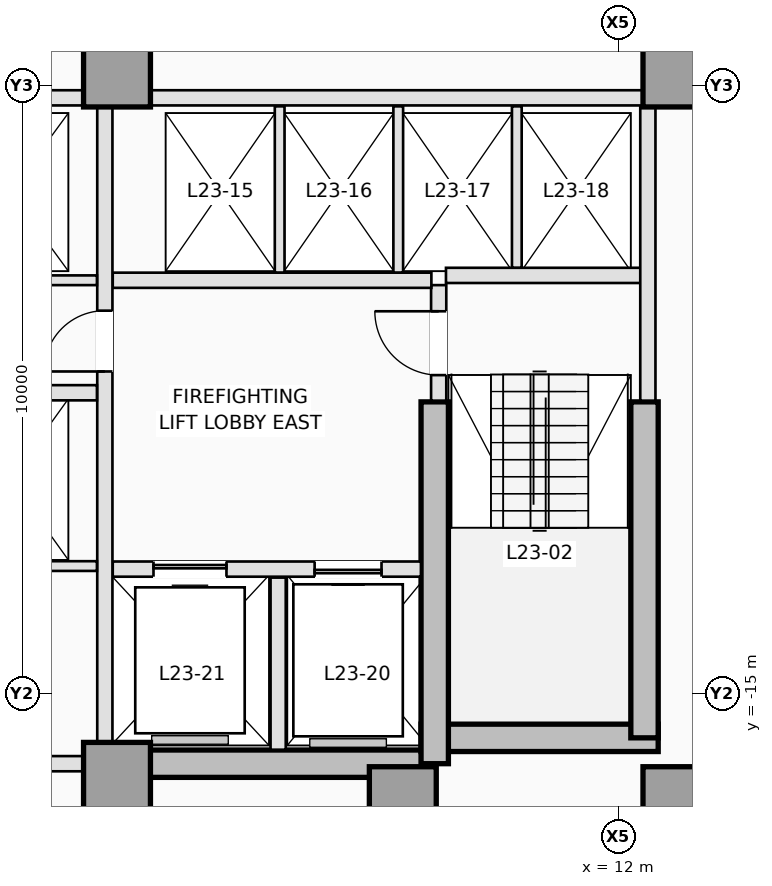
"""IFC4 building model, lengths in metres.
Left out: names, types, materials, properties, quantities, classifications, styles, units other than length and angle.
Written with IfcOpenShell. Run it as: python <this file> out.ifc"""

import sys

from ifc_helpers import new_model, si_unit, direction, frame, frame_2d, origin, origin_2d, place, context, subcontext, project, spatial, rectangle, extrude, element, fill, save


model = new_model("IFC4")
c1 = context("Model", 3, precision=1e-05, world=origin(), true_north=direction((0.0, 1.0)))
c2 = subcontext(c1, "Body", "Model", "MODEL_VIEW")
j1 = project(units=[si_unit("LENGTHUNIT", "METRE"), si_unit("PLANEANGLEUNIT", "RADIAN")], contexts=[c1])
p1 = place(None, origin())
s1 = spatial("IfcSite", under=j1, at=p1, CompositionType="ELEMENT")
p2 = place(p1, origin())
s2 = spatial("IfcBuilding", under=s1, at=p2, CompositionType="ELEMENT")
p3 = place(p2, frame((0.0, 0.0, 87.1)))
s3 = spatial("IfcBuildingStorey", under=s2, at=p3, CompositionType="ELEMENT", Elevation=87.1)
p4 = place(p3, frame((3.75, -16.15, 0.0), z_axis=(0.0, 0.0, 1.0), x_axis=(1.0, 0.0, 0.0)))
e1 = element("IfcWall", 1, at=p4, inside=s3, PredefinedType="SHEAR", context=c2, shape_type="SweptSolid", body=[
    extrude(rectangle(XDim=5.225, YDim=0.45, at=frame_2d((2.613, 0.0))), origin(), (0.0, 0.0, 1.0), 3.5),
])
p5 = place(p3, frame((8.75, -15.725, 0.0), z_axis=(0.0, 0.0, 1.0), x_axis=(1.0, 0.0, 0.0)))
e2 = element("IfcWall", 2, at=p5, inside=s3, PredefinedType="SHEAR", context=c2, shape_type="SweptSolid", body=[
    extrude(rectangle(XDim=3.9, YDim=0.45, at=frame_2d((1.95, 0.0))), origin(), (0.0, 0.0, 1.0), 3.5),
])
p6 = place(p3, frame((12.425, -15.725, 0.0), z_axis=(0.0, 0.0, 1.0), x_axis=(0.0, 1.0, 0.0)))
e3 = element("IfcWall", 3, at=p6, inside=s3, PredefinedType="SHEAR", context=c2, shape_type="SweptSolid", body=[
    extrude(rectangle(XDim=5.525, YDim=0.45, at=frame_2d((2.763, 0.0))), origin(), (0.0, 0.0, 1.0), 3.5),
])
p7 = place(p3, frame((8.975, -16.15, 0.0), z_axis=(0.0, 0.0, 1.0), x_axis=(0.0, 1.0, 0.0)))
e4 = element("IfcWall", 4, at=p7, inside=s3, PredefinedType="SHEAR", context=c2, shape_type="SweptSolid", body=[
    extrude(rectangle(XDim=5.95, YDim=0.45, at=frame_2d((2.975, 0.0))), origin(), (0.0, 0.0, 1.0), 3.5),
])
for number, where, z_axis, x_axis in (
    (5, (3.75, -16.35, 0.0), (0.0, 0.0, 1.0), (1.0, 0.0, 0.0)),
    (6, (8.45, -16.75, 0.0), (0.0, 0.0, 1.0), (1.0, 0.0, 0.0)),
    (7, (12.95, -16.75, 0.0), (0.0, 0.0, 1.0), (1.0, 0.0, 0.0)),
    (8, (3.75, -4.8, 0.0), (0.0, 0.0, 1.0), (1.0, 0.0, 0.0)),
    (9, (12.95, -4.8, 0.0), (0.0, 0.0, 1.0), (1.0, 0.0, 0.0)),
):
    element("IfcColumn", number, at=place(p3, frame(where, z_axis=z_axis, x_axis=x_axis)), inside=s3, PredefinedType="COLUMN", context=c2, shape_type="SweptSolid", body=[
        extrude(rectangle(XDim=1.1, YDim=1.1, at=origin_2d()), origin(), (0.0, 0.0, 1.0), 3.5),
    ])
p8 = place(p3, frame((9.04, -10.18, 0.0), z_axis=(0.0, 0.0, 1.0), x_axis=(0.0, 1.0, 0.0)))
e10 = element("IfcWall", 10, at=p8, inside=s3, PredefinedType="PARTITIONING", context=c2, shape_type="SweptSolid", body=[
    extrude(rectangle(XDim=1.9, YDim=0.25, at=frame_2d((0.95, 0.0))), origin(), (0.0, 0.0, 1.0), 3.14),
])
p9 = place(p8, frame((0.42, 0.0, 0.0)))
e11 = element("IfcOpeningElement", 11, at=p9, cuts=e10, PredefinedType="OPENING", context=c2, shape_type="SweptSolid", body=[
    extrude(rectangle(XDim=1.05, YDim=2.15, at=frame_2d((0.525, 1.075))), frame((0.0, 0.135, 0.0), z_axis=(0.0, -1.0, 0.0), x_axis=(1.0, 0.0, 0.0)), (0.0, 0.0, 1.0), 0.27),
])
p10 = place(p3, frame((9.16, -8.12, 0.0), z_axis=(0.0, 0.0, 1.0), x_axis=(1.0, 0.0, 0.0)))
e12 = element("IfcWall", 12, at=p10, inside=s3, PredefinedType="PARTITIONING", context=c2, shape_type="SweptSolid", body=[
    extrude(rectangle(XDim=3.22, YDim=0.25, at=frame_2d((1.61, 0.0))), origin(), (0.0, 0.0, 1.0), 3.14),
])
p11 = place(p3, frame((12.48, -10.18, 0.0), z_axis=(0.0, 0.0, 1.0), x_axis=(0.0, 1.0, 0.0)))
e13 = element("IfcWall", 13, at=p11, inside=s3, PredefinedType="PARTITIONING", context=c2, shape_type="SweptSolid", body=[
    extrude(rectangle(XDim=4.828, YDim=0.25, at=frame_2d((2.414, 0.0))), origin(), (0.0, 0.0, 1.0), 3.14),
])
p12 = place(p3, frame((3.68, -12.95, 0.0), z_axis=(0.0, 0.0, 1.0), x_axis=(1.0, 0.0, 0.0)))
e14 = element("IfcWall", 14, at=p12, inside=s3, PredefinedType="PARTITIONING", context=c2, shape_type="SweptSolid", body=[
    extrude(rectangle(XDim=5.068, YDim=0.25, at=frame_2d((2.534, 0.0))), origin(), (0.0, 0.0, 1.0), 3.14),
])
p13 = place(p12, frame((3.32, 0.0, 0.0)))
e15 = element("IfcOpeningElement", 15, at=p13, cuts=e14, PredefinedType="OPENING", context=c2, shape_type="SweptSolid", body=[
    extrude(rectangle(XDim=1.1, YDim=2.15, at=frame_2d((0.55, 1.075))), frame((0.0, 0.135, 0.0), z_axis=(0.0, -1.0, 0.0), x_axis=(1.0, 0.0, 0.0)), (0.0, 0.0, 1.0), 0.27),
])
p14 = place(p12, frame((0.67, 0.0, 0.0)))
e16 = element("IfcOpeningElement", 16, at=p14, cuts=e14, PredefinedType="OPENING", context=c2, shape_type="SweptSolid", body=[
    extrude(rectangle(XDim=1.2, YDim=2.15, at=frame_2d((0.6, 1.075))), frame((0.0, 0.135, 0.0), z_axis=(0.0, -1.0, 0.0), x_axis=(1.0, 0.0, 0.0)), (0.0, 0.0, 1.0), 0.27),
])
p15 = place(p3, frame((6.4, -15.92, 0.0), z_axis=(0.0, 0.0, 1.0), x_axis=(0.0, 1.0, 0.0)))
e17 = element("IfcWall", 17, at=p15, inside=s3, PredefinedType="PARTITIONING", context=c2, shape_type="SweptSolid", body=[
    extrude(rectangle(XDim=2.83, YDim=0.25, at=frame_2d((1.415, 0.0))), origin(), (0.0, 0.0, 1.0), 3.14),
])
p16 = place(p3, frame((3.68, -8.2, 0.0), z_axis=(0.0, 0.0, 1.0), x_axis=(1.0, 0.0, 0.0)))
e18 = element("IfcWall", 18, at=p16, inside=s3, PredefinedType="PARTITIONING", context=c2, shape_type="SweptSolid", body=[
    extrude(rectangle(XDim=5.24, YDim=0.25, at=frame_2d((2.62, 0.0))), origin(), (0.0, 0.0, 1.0), 3.14),
])
p17 = place(p3, frame((3.55, -15.798, 0.0), z_axis=(0.0, 0.0, 1.0), x_axis=(0.0, 1.0, 0.0)))
e19 = element("IfcWall", 19, at=p17, inside=s3, PredefinedType="PARTITIONING", context=c2, shape_type="SweptSolid", body=[
    extrude(rectangle(XDim=10.446, YDim=0.25, at=frame_2d((5.223, 0.0))), origin(), (0.0, 0.0, 1.0), 3.14),
])
p18 = place(p17, frame((6.098, 0.0, 0.0)))
e20 = element("IfcOpeningElement", 20, at=p18, cuts=e19, PredefinedType="OPENING", context=c2, shape_type="SweptSolid", body=[
    extrude(rectangle(XDim=1.0, YDim=2.15, at=frame_2d((0.5, 1.075))), frame((0.0, 0.135, 0.0), z_axis=(0.0, -1.0, 0.0), x_axis=(1.0, 0.0, 0.0)), (0.0, 0.0, 1.0), 0.27),
])
p19 = place(p3, frame((4.302, -5.2, 0.0), z_axis=(0.0, 0.0, 1.0), x_axis=(1.0, 0.0, 0.0)))
e21 = element("IfcWall", 21, at=p19, inside=s3, PredefinedType="PARTITIONING", context=c2, shape_type="SweptSolid", body=[
    extrude(rectangle(XDim=8.096, YDim=0.25, at=frame_2d((4.048, 0.0))), origin(), (0.0, 0.0, 1.0), 3.14),
])
p20 = place(p3, frame((0.95, -5.2, 0.0), z_axis=(0.0, 0.0, 1.0), x_axis=(1.0, 0.0, 0.0)))
e22 = element("IfcWall", 22, at=p20, inside=s3, PredefinedType="PARTITIONING", context=c2, shape_type="SweptSolid", body=[
    extrude(rectangle(XDim=2.248, YDim=0.25, at=frame_2d((1.124, 0.0))), origin(), (0.0, 0.0, 1.0), 3.14),
])
for number, where, z_axis, x_axis in (
    (23, (6.425, -8.073, 0.0), (0.0, 0.0, 1.0), (0.0, 1.0, 0.0)),
    (24, (8.375, -8.073, 0.0), (0.0, 0.0, 1.0), (0.0, 1.0, 0.0)),
):
    element("IfcWall", number, at=place(p3, frame(where, z_axis=z_axis, x_axis=x_axis)), inside=s3, PredefinedType="PARTITIONING", context=c2, shape_type="SweptSolid", body=[
        extrude(rectangle(XDim=2.733, YDim=0.16, at=frame_2d((1.366, 0.0))), origin(), (0.0, 0.0, 1.0), 3.14),
    ])
p21 = place(p3, frame((10.325, -7.993, 0.0), z_axis=(0.0, 0.0, 1.0), x_axis=(0.0, 1.0, 0.0)))
e25 = element("IfcWall", 25, at=p21, inside=s3, PredefinedType="PARTITIONING", context=c2, shape_type="SweptSolid", body=[
    extrude(rectangle(XDim=2.653, YDim=0.16, at=frame_2d((1.326, 0.0))), origin(), (0.0, 0.0, 1.0), 3.14),
])
p22 = place(p3, frame((-3.198, -16.15, 0.0), z_axis=(0.0, 0.0, 1.0), x_axis=(1.0, 0.0, 0.0)))
e26 = element("IfcWall", 26, at=p22, inside=s3, PredefinedType="PARTITIONING", context=c2, shape_type="SweptSolid", body=[
    extrude(rectangle(XDim=6.396, YDim=0.25, at=frame_2d((3.198, 0.0))), origin(), (0.0, 0.0, 1.0), 2.19),
])
p23 = place(p3, frame((0.95, -8.2, 0.0), z_axis=(0.0, 0.0, 1.0), x_axis=(1.0, 0.0, 0.0)))
e27 = element("IfcWall", 27, at=p23, inside=s3, PredefinedType="PARTITIONING", context=c2, shape_type="SweptSolid", body=[
    extrude(rectangle(XDim=2.47, YDim=0.16, at=frame_2d((1.235, 0.0))), origin(), (0.0, 0.0, 1.0), 3.14),
])
p24 = place(p3, frame((0.95, -10.05, 0.0), z_axis=(0.0, 0.0, 1.0), x_axis=(1.0, 0.0, 0.0)))
e28 = element("IfcWall", 28, at=p24, inside=s3, PredefinedType="PARTITIONING", context=c2, shape_type="SweptSolid", body=[
    extrude(rectangle(XDim=2.47, YDim=0.25, at=frame_2d((1.235, 0.0))), origin(), (0.0, 0.0, 1.0), 3.14),
])
p25 = place(p3, frame((-3.42, -12.9, 0.0), z_axis=(0.0, 0.0, 1.0), x_axis=(1.0, 0.0, 0.0)))
e29 = element("IfcWall", 29, at=p25, inside=s3, PredefinedType="PARTITIONING", context=c2, shape_type="SweptSolid", body=[
    extrude(rectangle(XDim=6.84, YDim=0.16, at=frame_2d((3.42, 0.0))), origin(), (0.0, 0.0, 1.0), 3.14),
])
p26 = place(p25, frame((2.98, 0.0, 0.0)))
e30 = element("IfcOpeningElement", 30, at=p26, cuts=e29, PredefinedType="OPENING", context=c2, shape_type="SweptSolid", body=[
    extrude(rectangle(XDim=0.88, YDim=2.12, at=frame_2d((0.44, 1.06))), frame((0.0, 0.09, 0.0), z_axis=(0.0, -1.0, 0.0), x_axis=(1.0, 0.0, 0.0)), (0.0, 0.0, 1.0), 0.18),
])
p27 = place(p13, origin())
e31 = element("IfcDoor", 31, at=p27, inside=s3, OperationType="SLIDING_TO_RIGHT", PredefinedType="DOOR", context=c2, shape_type="SweptSolid", body=[
    extrude(rectangle(XDim=1.1, YDim=2.15, at=frame_2d((0.55, 1.075))), frame((0.0, 0.025, 0.0), z_axis=(0.0, -1.0, 0.0), x_axis=(1.0, 0.0, 0.0)), (0.0, 0.0, 1.0), 0.05),
])
fill(e15, e31)
p28 = place(p14, origin())
e32 = element("IfcDoor", 32, at=p28, inside=s3, OperationType="SLIDING_TO_LEFT", PredefinedType="DOOR", context=c2, shape_type="SweptSolid", body=[
    extrude(rectangle(XDim=1.2, YDim=2.15, at=frame_2d((0.6, 1.075))), frame((0.0, 0.025, 0.0), z_axis=(0.0, -1.0, 0.0), x_axis=(1.0, 0.0, 0.0)), (0.0, 0.0, 1.0), 0.05),
])
fill(e16, e32)
p29 = place(p9, origin())
e33 = element("IfcDoor", 33, at=p29, inside=s3, OperationType="SINGLE_SWING_RIGHT", PredefinedType="DOOR", context=c2, shape_type="SweptSolid", body=[
    extrude(rectangle(XDim=1.05, YDim=2.15, at=frame_2d((0.525, 1.075))), frame((0.0, 0.025, 0.0), z_axis=(0.0, -1.0, 0.0), x_axis=(1.0, 0.0, 0.0)), (0.0, 0.0, 1.0), 0.05),
])
fill(e11, e33)
p30 = place(p18, origin())
e34 = element("IfcDoor", 34, at=p30, inside=s3, OperationType="SINGLE_SWING_LEFT", PredefinedType="DOOR", context=c2, shape_type="SweptSolid", body=[
    extrude(rectangle(XDim=1.0, YDim=2.15, at=frame_2d((0.5, 1.075))), frame((0.0, 0.025, 0.0), z_axis=(0.0, -1.0, 0.0), x_axis=(1.0, 0.0, 0.0)), (0.0, 0.0, 1.0), 0.05),
])
fill(e20, e34)
save(model, sys.argv[1])
